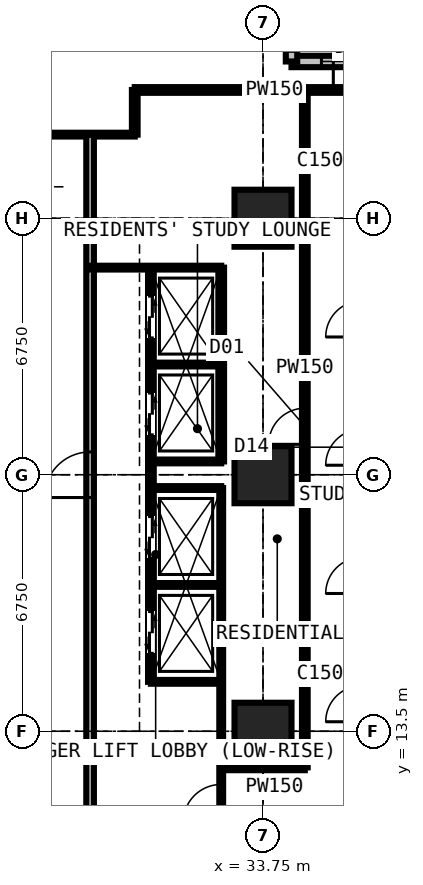
"""IFC4 building model, lengths in metres.
Left out: names, types, materials, properties, quantities, classifications, styles, units other than length and angle.
Written with IfcOpenShell. Run it as: python <this file> out.ifc"""

import sys

from ifc_helpers import new_model, si_unit, direction, frame, frame_2d, origin, origin_2d, place, context, subcontext, project, spatial, rectangle, extrude, element, fill, save


model = new_model("IFC4")
c1 = context("Model", 3, precision=1e-05, world=origin(), true_north=direction((0.0, 1.0)))
c2 = subcontext(c1, "Body", "Model", "MODEL_VIEW")
j1 = project(units=[si_unit("LENGTHUNIT", "METRE"), si_unit("PLANEANGLEUNIT", "RADIAN")], contexts=[c1])
p1 = place(None, origin())
s1 = spatial("IfcSite", under=j1, at=p1, CompositionType="ELEMENT")
p2 = place(p1, origin())
s2 = spatial("IfcBuilding", under=s1, at=p2, CompositionType="ELEMENT")
p3 = place(p2, frame((0.0, 0.0, 130.5)))
s3 = spatial("IfcBuildingStorey", under=s2, at=p3, CompositionType="ELEMENT", Elevation=130.5)
for number, where, z_axis, x_axis in (
    (1, (33.75, 13.5, 0.0), (0.0, 0.0, 1.0), (1.0, 0.0, 0.0)),
    (2, (33.75, 20.25, 0.0), (0.0, 0.0, 1.0), (1.0, 0.0, 0.0)),
    (3, (33.75, 27.0, 0.0), (0.0, 0.0, 1.0), (1.0, 0.0, 0.0)),
):
    element("IfcColumn", number, at=place(p3, frame(where, z_axis=z_axis, x_axis=x_axis)), inside=s3, PredefinedType="COLUMN", context=c2, shape_type="SweptSolid", body=[
        extrude(rectangle(XDim=1.5, YDim=1.5, at=origin_2d()), origin(), (0.0, 0.0, 1.0), 3.6),
    ])
p4 = place(p3, frame((37.875, 31.125, 0.0), z_axis=(0.0, 0.0, 1.0), x_axis=(-1.0, 0.0, 0.0)))
e4 = element("IfcWall", 4, at=p4, inside=s3, PredefinedType="SOLIDWALL", context=c2, shape_type="SweptSolid", body=[
    extrude(rectangle(XDim=3.375, YDim=0.3, at=frame_2d((1.688, 0.0))), origin(), (0.0, 0.0, 1.0), 3.375),
])
p5 = place(p4, frame((0.788, 0.0, 0.6)))
e5 = element("IfcOpeningElement", 5, at=p5, cuts=e4, PredefinedType="OPENING", context=c2, shape_type="SweptSolid", body=[
    extrude(rectangle(XDim=1.8, YDim=2.1, at=frame_2d((0.9, 1.05))), frame((0.0, 0.16, 0.0), z_axis=(0.0, -1.0, 0.0), x_axis=(1.0, 0.0, 0.0)), (0.0, 0.0, 1.0), 0.32),
])
p6 = place(p3, frame((34.5, 31.125, 0.0), z_axis=(0.0, 0.0, 1.0), x_axis=(0.0, 1.0, 0.0)))
e6 = element("IfcWall", 6, at=p6, inside=s3, PredefinedType="SOLIDWALL", context=c2, shape_type="SweptSolid", body=[
    extrude(rectangle(XDim=3.375, YDim=0.3, at=frame_2d((1.688, 0.0))), origin(), (0.0, 0.0, 1.0), 3.375),
])
p7 = place(p6, frame((0.268, 0.0, 0.9)))
e7 = element("IfcOpeningElement", 7, at=p7, cuts=e6, PredefinedType="OPENING", context=c2, shape_type="SweptSolid", body=[
    extrude(rectangle(XDim=1.5, YDim=1.8, at=frame_2d((0.75, 0.9))), frame((0.0, 0.16, 0.0), z_axis=(0.0, -1.0, 0.0), x_axis=(1.0, 0.0, 0.0)), (0.0, 0.0, 1.0), 0.32),
])
p8 = place(p3, frame((11.3, 29.2, 0.0), z_axis=(0.0, 0.0, 1.0), x_axis=(1.0, 0.0, 0.0)))
e8 = element("IfcWall", 8, at=p8, inside=s3, PredefinedType="PARTITIONING", context=c2, shape_type="SweptSolid", body=[
    extrude(rectangle(XDim=19.075, YDim=0.1, at=frame_2d((9.538, 0.0))), origin(), (0.0, 0.0, 1.0), 3.375),
])
p9 = place(p8, frame((6.4, 0.0, 0.0)))
e9 = element("IfcOpeningElement", 9, at=p9, cuts=e8, PredefinedType="OPENING", context=c2, shape_type="SweptSolid", body=[
    extrude(rectangle(XDim=0.95, YDim=2.2, at=frame_2d((0.475, 1.1))), frame((0.0, 0.06, 0.0), z_axis=(0.0, -1.0, 0.0), x_axis=(1.0, 0.0, 0.0)), (0.0, 0.0, 1.0), 0.12),
])
p10 = place(p8, frame((13.15, 0.0, 0.0)))
e10 = element("IfcOpeningElement", 10, at=p10, cuts=e8, PredefinedType="OPENING", context=c2, shape_type="SweptSolid", body=[
    extrude(rectangle(XDim=0.95, YDim=2.2, at=frame_2d((0.475, 1.1))), frame((0.0, 0.06, 0.0), z_axis=(0.0, -1.0, 0.0), x_axis=(1.0, 0.0, 0.0)), (0.0, 0.0, 1.0), 0.12),
])
p11 = place(p8, frame((0.6, 0.0, 0.0)))
e11 = element("IfcOpeningElement", 11, at=p11, cuts=e8, PredefinedType="OPENING", context=c2, shape_type="SweptSolid", body=[
    extrude(rectangle(XDim=1.0, YDim=2.2, at=frame_2d((0.5, 1.1))), frame((0.0, 0.06, 0.0), z_axis=(0.0, -1.0, 0.0), x_axis=(1.0, 0.0, 0.0)), (0.0, 0.0, 1.0), 0.12),
])
p12 = place(p3, frame((29.2, 11.3, 0.0), z_axis=(0.0, 0.0, 1.0), x_axis=(0.0, 1.0, 0.0)))
e12 = element("IfcWall", 12, at=p12, inside=s3, PredefinedType="PARTITIONING", context=c2, shape_type="SweptSolid", body=[
    extrude(rectangle(XDim=17.9, YDim=0.2, at=frame_2d((8.95, 0.0))), origin(), (0.0, 0.0, 1.0), 3.375),
])
p13 = place(p12, frame((8.35, 0.0, 0.0)))
e13 = element("IfcOpeningElement", 13, at=p13, cuts=e12, PredefinedType="OPENING", context=c2, shape_type="SweptSolid", body=[
    extrude(rectangle(XDim=1.2, YDim=2.2, at=frame_2d((0.6, 1.1))), frame((0.0, 0.11, 0.0), z_axis=(0.0, -1.0, 0.0), x_axis=(1.0, 0.0, 0.0)), (0.0, 0.0, 1.0), 0.22),
])
p14 = place(p3, frame((29.2, 25.7, 0.0), z_axis=(0.0, 0.0, 1.0), x_axis=(1.0, 0.0, 0.0)))
e14 = element("IfcWall", 14, at=p14, inside=s3, PredefinedType="SHEAR", context=c2, shape_type="SweptSolid", body=[
    extrude(rectangle(XDim=3.45, YDim=0.1, at=frame_2d((1.725, 0.0))), origin(), (0.0, 0.0, 1.0), 3.375),
])
p15 = place(p3, frame((30.375, 29.2, 0.0), z_axis=(0.0, 0.0, 1.0), x_axis=(0.0, 1.0, 0.0)))
e15 = element("IfcWall", 15, at=p15, inside=s3, PredefinedType="PARTITIONING", context=c2, shape_type="SweptSolid", body=[
    extrude(rectangle(XDim=1.175, YDim=0.15, at=frame_2d((0.587, 0.0))), origin(), (0.0, 0.0, 1.0), 3.375),
])
p16 = place(p3, frame((30.375, 30.375, 0.0), z_axis=(0.0, 0.0, 1.0), x_axis=(1.0, 0.0, 0.0)))
e16 = element("IfcWall", 16, at=p16, inside=s3, PredefinedType="PARTITIONING", context=c2, shape_type="SweptSolid", body=[
    extrude(rectangle(XDim=7.35, YDim=0.15, at=frame_2d((3.675, 0.0))), origin(), (0.0, 0.0, 1.0), 2.877),
])
p17 = place(p16, frame((5.225, 0.0, 0.0)))
e17 = element("IfcOpeningElement", 17, at=p17, cuts=e16, PredefinedType="OPENING", context=c2, shape_type="SweptSolid", body=[
    extrude(rectangle(XDim=1.0, YDim=2.2, at=frame_2d((0.5, 1.1))), frame((0.0, 0.085, 0.0), z_axis=(0.0, -1.0, 0.0), x_axis=(1.0, 0.0, 0.0)), (0.0, 0.0, 1.0), 0.17),
])
p18 = place(p3, frame((30.8, 14.8, 0.0), z_axis=(0.0, 0.0, 1.0), x_axis=(0.0, 1.0, 0.0)))
e18 = element("IfcWall", 18, at=p18, inside=s3, PredefinedType="PARTITIONING", context=c2, shape_type="SweptSolid", body=[
    extrude(rectangle(XDim=10.9, YDim=0.15, at=frame_2d((5.45, 0.0))), origin(), (0.0, 0.0, 1.0), 3.375),
])
p19 = place(p18, frame((0.75, 0.0, 0.0)))
e19 = element("IfcOpeningElement", 19, at=p19, cuts=e18, PredefinedType="OPENING", context=c2, shape_type="SweptSolid", body=[
    extrude(rectangle(XDim=1.1, YDim=2.2, at=frame_2d((0.55, 1.1))), frame((0.0, 0.085, 0.0), z_axis=(0.0, -1.0, 0.0), x_axis=(1.0, 0.0, 0.0)), (0.0, 0.0, 1.0), 0.17),
])
p20 = place(p18, frame((3.25, 0.0, 0.0)))
e20 = element("IfcOpeningElement", 20, at=p20, cuts=e18, PredefinedType="OPENING", context=c2, shape_type="SweptSolid", body=[
    extrude(rectangle(XDim=1.1, YDim=2.2, at=frame_2d((0.55, 1.1))), frame((0.0, 0.085, 0.0), z_axis=(0.0, -1.0, 0.0), x_axis=(1.0, 0.0, 0.0)), (0.0, 0.0, 1.0), 0.17),
])
p21 = place(p18, frame((6.5, 0.0, 0.0)))
e21 = element("IfcOpeningElement", 21, at=p21, cuts=e18, PredefinedType="OPENING", context=c2, shape_type="SweptSolid", body=[
    extrude(rectangle(XDim=1.1, YDim=2.2, at=frame_2d((0.55, 1.1))), frame((0.0, 0.085, 0.0), z_axis=(0.0, -1.0, 0.0), x_axis=(1.0, 0.0, 0.0)), (0.0, 0.0, 1.0), 0.17),
])
p22 = place(p18, frame((9.05, 0.0, 0.0)))
e22 = element("IfcOpeningElement", 22, at=p22, cuts=e18, PredefinedType="OPENING", context=c2, shape_type="SweptSolid", body=[
    extrude(rectangle(XDim=1.1, YDim=2.2, at=frame_2d((0.55, 1.1))), frame((0.0, 0.085, 0.0), z_axis=(0.0, -1.0, 0.0), x_axis=(1.0, 0.0, 0.0)), (0.0, 0.0, 1.0), 0.17),
])
for number, where, z_axis, x_axis in (
    (23, (30.8, 14.8, 0.0), (0.0, 0.0, 1.0), (1.0, 0.0, 0.0)),
    (24, (30.8, 17.35, 0.0), (0.0, 0.0, 1.0), (1.0, 0.0, 0.0)),
    (25, (30.8, 19.9, 0.0), (0.0, 0.0, 1.0), (1.0, 0.0, 0.0)),
    (26, (30.8, 20.6, 0.0), (0.0, 0.0, 1.0), (1.0, 0.0, 0.0)),
    (27, (30.8, 23.15, 0.0), (0.0, 0.0, 1.0), (1.0, 0.0, 0.0)),
):
    element("IfcWall", number, at=place(p3, frame(where, z_axis=z_axis, x_axis=x_axis)), inside=s3, PredefinedType="SHEAR", context=c2, shape_type="SweptSolid", body=[
        extrude(rectangle(XDim=1.85, YDim=0.1, at=frame_2d((0.925, 0.0))), origin(), (0.0, 0.0, 1.0), 3.375),
    ])
p23 = place(p3, frame((32.65, 10.6, 0.0), z_axis=(0.0, 0.0, 1.0), x_axis=(0.0, 1.0, 0.0)))
e28 = element("IfcWall", 28, at=p23, inside=s3, PredefinedType="SHEAR", context=c2, shape_type="SweptSolid", body=[
    extrude(rectangle(XDim=9.3, YDim=0.1, at=frame_2d((4.65, 0.0))), origin(), (0.0, 0.0, 1.0), 3.375),
])
p24 = place(p23, frame((0.5, 0.0, 0.0)))
e29 = element("IfcOpeningElement", 29, at=p24, cuts=e28, PredefinedType="OPENING", context=c2, shape_type="SweptSolid", body=[
    extrude(rectangle(XDim=1.0, YDim=2.2, at=frame_2d((0.5, 1.1))), frame((0.0, 0.06, 0.0), z_axis=(0.0, -1.0, 0.0), x_axis=(1.0, 0.0, 0.0)), (0.0, 0.0, 1.0), 0.12),
])
p25 = place(p3, frame((32.65, 12.55, 0.0), z_axis=(0.0, 0.0, 1.0), x_axis=(1.0, 0.0, 0.0)))
e30 = element("IfcWall", 30, at=p25, inside=s3, PredefinedType="PARTITIONING", context=c2, shape_type="SweptSolid", body=[
    extrude(rectangle(XDim=2.2, YDim=0.15, at=frame_2d((1.1, 0.0))), origin(), (0.0, 0.0, 1.0), 3.375),
])
p26 = place(p3, frame((32.65, 20.6, 0.0), z_axis=(0.0, 0.0, 1.0), x_axis=(0.0, 1.0, 0.0)))
e31 = element("IfcWall", 31, at=p26, inside=s3, PredefinedType="PARTITIONING", context=c2, shape_type="SweptSolid", body=[
    extrude(rectangle(XDim=5.1, YDim=0.15, at=frame_2d((2.55, 0.0))), origin(), (0.0, 0.0, 1.0), 3.375),
])
p27 = place(p3, frame((34.85, 12.55, 0.0), z_axis=(0.0, 0.0, 1.0), x_axis=(0.0, 1.0, 0.0)))
e32 = element("IfcWall", 32, at=p27, inside=s3, PredefinedType="PARTITIONING", context=c2, shape_type="SweptSolid", body=[
    extrude(rectangle(XDim=17.825, YDim=0.15, at=frame_2d((8.913, 0.0))), origin(), (0.0, 0.0, 1.0), 3.375),
])
p28 = place(p27, frame((8.5, 0.0, 0.0)))
e33 = element("IfcOpeningElement", 33, at=p28, cuts=e32, PredefinedType="OPENING", context=c2, shape_type="SweptSolid", body=[
    extrude(rectangle(XDim=0.95, YDim=2.2, at=frame_2d((0.475, 1.1))), frame((0.0, 0.085, 0.0), z_axis=(0.0, -1.0, 0.0), x_axis=(1.0, 0.0, 0.0)), (0.0, 0.0, 1.0), 0.17),
])
p29 = place(p5, origin())
e34 = element("IfcWindow", 34, at=p29, inside=s3, PartitioningType="SINGLE_PANEL", PredefinedType="WINDOW", context=c2, shape_type="SweptSolid", body=[
    extrude(rectangle(XDim=1.8, YDim=2.1, at=frame_2d((0.9, 1.05))), frame((0.0, 0.03, 0.0), z_axis=(0.0, -1.0, 0.0), x_axis=(1.0, 0.0, 0.0)), (0.0, 0.0, 1.0), 0.06),
])
fill(e5, e34)
p30 = place(p24, origin())
e35 = element("IfcDoor", 35, at=p30, inside=s3, OperationType="SINGLE_SWING_LEFT", PredefinedType="DOOR", context=c2, shape_type="SweptSolid", body=[
    extrude(rectangle(XDim=1.0, YDim=2.2, at=frame_2d((0.5, 1.1))), frame((0.0, 0.025, 0.0), z_axis=(0.0, -1.0, 0.0), x_axis=(1.0, 0.0, 0.0)), (0.0, 0.0, 1.0), 0.05),
])
fill(e29, e35)
p31 = place(p28, origin())
e36 = element("IfcDoor", 36, at=p31, inside=s3, OperationType="SINGLE_SWING_LEFT", PredefinedType="DOOR", context=c2, shape_type="SweptSolid", body=[
    extrude(rectangle(XDim=0.95, YDim=2.2, at=frame_2d((0.475, 1.1))), frame((0.0, 0.025, 0.0), z_axis=(0.0, -1.0, 0.0), x_axis=(1.0, 0.0, 0.0)), (0.0, 0.0, 1.0), 0.05),
])
fill(e33, e36)
p32 = place(p17, origin())
e37 = element("IfcDoor", 37, at=p32, inside=s3, OperationType="SINGLE_SWING_LEFT", PredefinedType="DOOR", context=c2, shape_type="SweptSolid", body=[
    extrude(rectangle(XDim=1.0, YDim=2.2, at=frame_2d((0.5, 1.1))), frame((0.0, 0.025, 0.0), z_axis=(0.0, -1.0, 0.0), x_axis=(1.0, 0.0, 0.0)), (0.0, 0.0, 1.0), 0.05),
])
fill(e17, e37)
p33 = place(p19, origin())
e38 = element("IfcDoor", 38, at=p33, inside=s3, OperationType="DOUBLE_DOOR_SLIDING", PredefinedType="DOOR", context=c2, shape_type="SweptSolid", body=[
    extrude(rectangle(XDim=1.1, YDim=2.2, at=frame_2d((0.55, 1.1))), frame((0.0, 0.025, 0.0), z_axis=(0.0, -1.0, 0.0), x_axis=(1.0, 0.0, 0.0)), (0.0, 0.0, 1.0), 0.05),
])
fill(e19, e38)
p34 = place(p20, origin())
e39 = element("IfcDoor", 39, at=p34, inside=s3, OperationType="DOUBLE_DOOR_SLIDING", PredefinedType="DOOR", context=c2, shape_type="SweptSolid", body=[
    extrude(rectangle(XDim=1.1, YDim=2.2, at=frame_2d((0.55, 1.1))), frame((0.0, 0.025, 0.0), z_axis=(0.0, -1.0, 0.0), x_axis=(1.0, 0.0, 0.0)), (0.0, 0.0, 1.0), 0.05),
])
fill(e20, e39)
p35 = place(p21, origin())
e40 = element("IfcDoor", 40, at=p35, inside=s3, OperationType="DOUBLE_DOOR_SLIDING", PredefinedType="DOOR", context=c2, shape_type="SweptSolid", body=[
    extrude(rectangle(XDim=1.1, YDim=2.2, at=frame_2d((0.55, 1.1))), frame((0.0, 0.025, 0.0), z_axis=(0.0, -1.0, 0.0), x_axis=(1.0, 0.0, 0.0)), (0.0, 0.0, 1.0), 0.05),
])
fill(e21, e40)
p36 = place(p22, origin())
e41 = element("IfcDoor", 41, at=p36, inside=s3, OperationType="DOUBLE_DOOR_SLIDING", PredefinedType="DOOR", context=c2, shape_type="SweptSolid", body=[
    extrude(rectangle(XDim=1.1, YDim=2.2, at=frame_2d((0.55, 1.1))), frame((0.0, 0.025, 0.0), z_axis=(0.0, -1.0, 0.0), x_axis=(1.0, 0.0, 0.0)), (0.0, 0.0, 1.0), 0.05),
])
fill(e22, e41)
p37 = place(p13, origin())
e42 = element("IfcDoor", 42, at=p37, inside=s3, OperationType="DOUBLE_DOOR_SINGLE_SWING", PredefinedType="DOOR", context=c2, shape_type="SweptSolid", body=[
    extrude(rectangle(XDim=1.2, YDim=2.2, at=frame_2d((0.6, 1.1))), frame((0.0, 0.025, 0.0), z_axis=(0.0, -1.0, 0.0), x_axis=(1.0, 0.0, 0.0)), (0.0, 0.0, 1.0), 0.05),
])
fill(e13, e42)
save(model, sys.argv[1])
